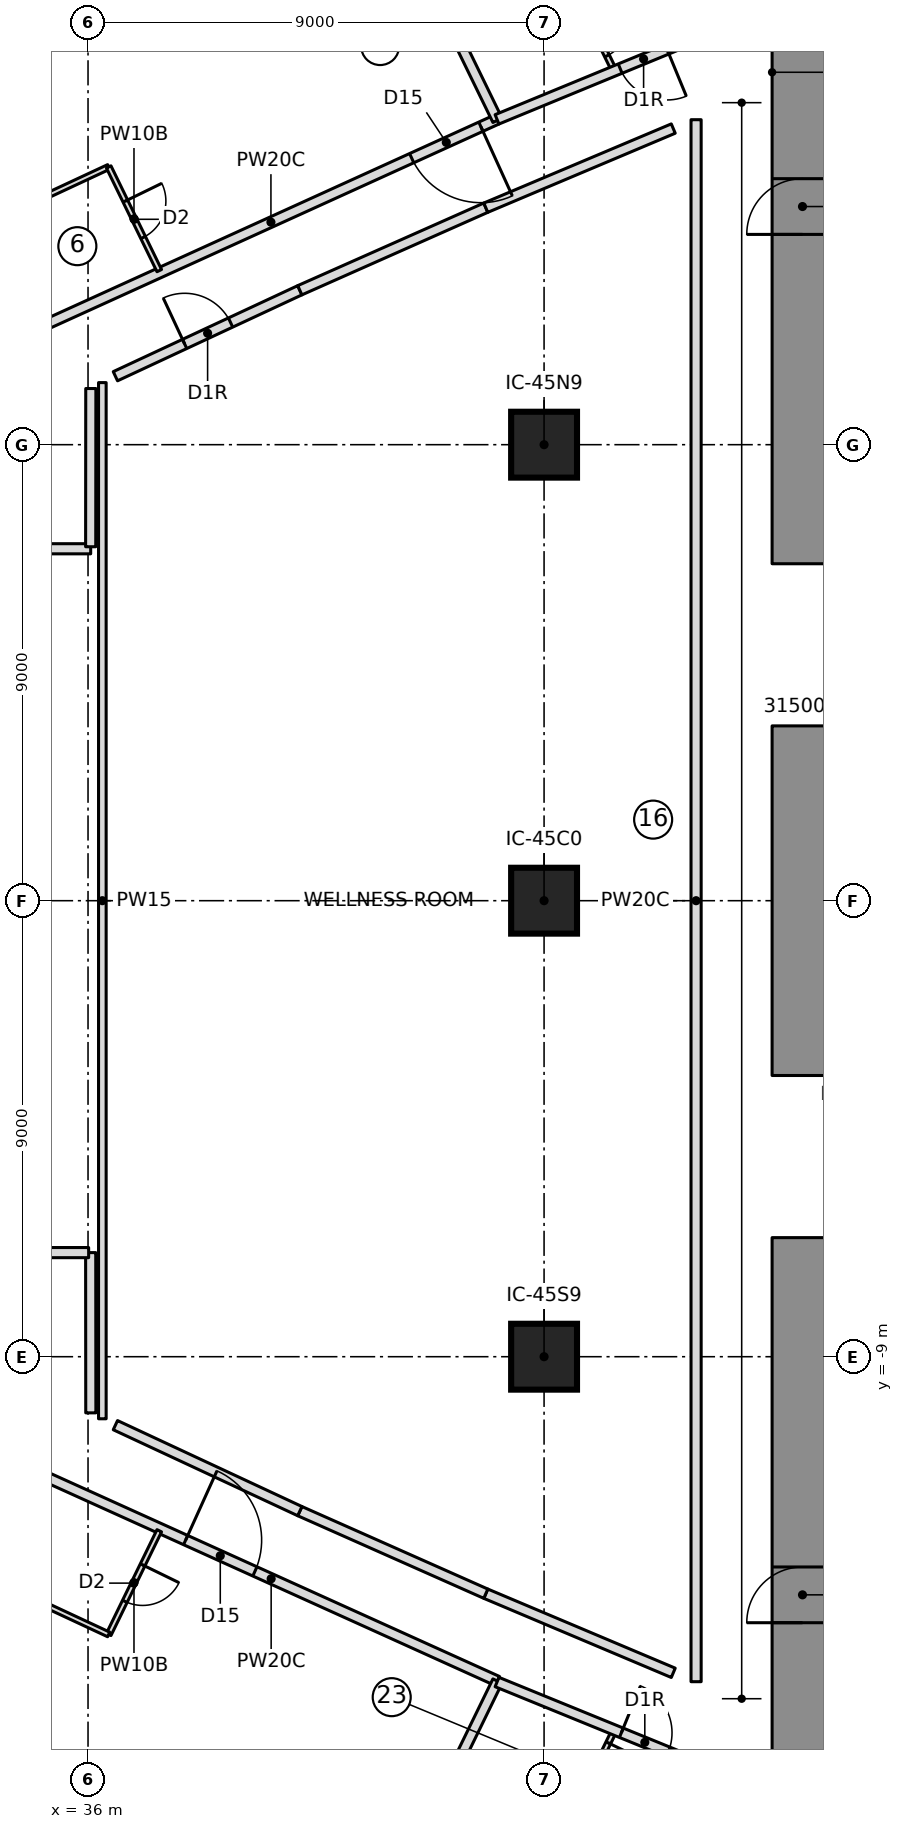
"""IFC4 building model, lengths in metres.
Left out: names, types, materials, properties, quantities, classifications, styles, units other than length and angle.
Written with IfcOpenShell. Run it as: python <this file> out.ifc"""

import sys

from ifc_helpers import new_model, si_unit, direction, frame, frame_2d, origin, origin_2d, place, context, subcontext, project, spatial, rectangle, extrude, element, fill, save


model = new_model("IFC4")
c1 = context("Model", 3, precision=1e-05, world=origin(), true_north=direction((0.0, 1.0)))
c2 = subcontext(c1, "Body", "Model", "MODEL_VIEW")
j1 = project(units=[si_unit("LENGTHUNIT", "METRE"), si_unit("PLANEANGLEUNIT", "RADIAN")], contexts=[c1])
p1 = place(None, origin())
s1 = spatial("IfcSite", under=j1, at=p1, CompositionType="ELEMENT")
p2 = place(p1, origin())
s2 = spatial("IfcBuilding", under=s1, at=p2, CompositionType="ELEMENT")
p3 = place(p2, frame((0.0, 0.0, 64.45)))
s3 = spatial("IfcBuildingStorey", under=s2, at=p3, CompositionType="ELEMENT", Elevation=64.45)
p4 = place(p3, frame((50.1, 6.65, 0.0), z_axis=(0.0, 0.0, 1.0), x_axis=(0.0, 1.0, 0.0)))
e1 = element("IfcWall", 1, at=p4, inside=s3, PredefinedType="SHEAR", context=c2, shape_type="SweptSolid", body=[
    extrude(rectangle(XDim=10.3, YDim=1.2, at=frame_2d((5.15, 0.0))), origin(), (0.0, 0.0, 1.0), 3.55),
])
p5 = place(p4, frame((6.5, 0.0, 0.0)))
e2 = element("IfcOpeningElement", 2, at=p5, cuts=e1, PredefinedType="OPENING", context=c2, shape_type="SweptSolid", body=[
    extrude(rectangle(XDim=1.1, YDim=2.1, at=frame_2d((0.55, 1.05))), frame((0.0, 0.61, 0.0), z_axis=(0.0, -1.0, 0.0), x_axis=(1.0, 0.0, 0.0)), (0.0, 0.0, 1.0), 1.22),
])
p6 = place(p3, frame((50.1, -3.45, 0.0), z_axis=(0.0, 0.0, 1.0), x_axis=(0.0, 1.0, 0.0)))
e3 = element("IfcWall", 3, at=p6, inside=s3, PredefinedType="SHEAR", context=c2, shape_type="SweptSolid", body=[
    extrude(rectangle(XDim=6.9, YDim=1.2, at=frame_2d((3.45, 0.0))), origin(), (0.0, 0.0, 1.0), 3.55),
])
p7 = place(p3, frame((50.1, -16.95, 0.0), z_axis=(0.0, 0.0, 1.0), x_axis=(0.0, 1.0, 0.0)))
e4 = element("IfcWall", 4, at=p7, inside=s3, PredefinedType="SHEAR", context=c2, shape_type="SweptSolid", body=[
    extrude(rectangle(XDim=10.3, YDim=1.2, at=frame_2d((5.15, 0.0))), origin(), (0.0, 0.0, 1.0), 3.55),
])
p8 = place(p7, frame((2.7, 0.0, 0.0)))
e5 = element("IfcOpeningElement", 5, at=p8, cuts=e4, PredefinedType="OPENING", context=c2, shape_type="SweptSolid", body=[
    extrude(rectangle(XDim=1.1, YDim=2.1, at=frame_2d((0.55, 1.05))), frame((0.0, 0.61, 0.0), z_axis=(0.0, -1.0, 0.0), x_axis=(1.0, 0.0, 0.0)), (0.0, 0.0, 1.0), 1.22),
])
for number, where, z_axis, x_axis in (
    (6, (45.0, -9.0, 0.0), (0.0, 0.0, 1.0), (1.0, 0.0, 0.0)),
    (7, (45.0, 0.0, 0.0), (0.0, 0.0, 1.0), (1.0, 0.0, 0.0)),
    (8, (45.0, 9.0, 0.0), (0.0, 0.0, 1.0), (1.0, 0.0, 0.0)),
):
    element("IfcColumn", number, at=place(p3, frame(where, z_axis=z_axis, x_axis=x_axis)), inside=s3, PredefinedType="COLUMN", context=c2, shape_type="SweptSolid", body=[
        extrude(rectangle(XDim=1.3, YDim=1.3, at=origin_2d()), origin(), (0.0, 0.0, 1.0), 3.55),
    ])
p9 = place(p3, frame((44.072, 15.421, 0.0), z_axis=(0.0, 0.0, 1.0), x_axis=(-0.910287143541, -0.413977434534, 0.0)))
e9 = element("IfcWall", 9, at=p9, inside=s3, PredefinedType="PARTITIONING", context=c2, shape_type="SweptSolid", body=[
    extrude(rectangle(XDim=9.803, YDim=0.2, at=frame_2d((4.902, 0.0))), origin(), (0.0, 0.0, 1.0), 3.25),
])
p10 = place(p9, frame((0.35, 0.0, 0.0)))
e10 = element("IfcOpeningElement", 10, at=p10, cuts=e9, PredefinedType="OPENING", context=c2, shape_type="SweptSolid", body=[
    extrude(rectangle(XDim=1.5, YDim=2.1, at=frame_2d((0.75, 1.05))), frame((0.0, 0.11, 0.0), z_axis=(0.0, -1.0, 0.0), x_axis=(1.0, 0.0, 0.0)), (0.0, 0.0, 1.0), 0.22),
])
p11 = place(p3, frame((34.903, 13.781, 0.0), z_axis=(0.0, 0.0, 1.0), x_axis=(0.906434605418, 0.422346192242, 0.0)))
e11 = element("IfcWall", 11, at=p11, inside=s3, PredefinedType="PARTITIONING", context=c2, shape_type="SweptSolid", body=[
    extrude(rectangle(XDim=1.661, YDim=0.1, at=frame_2d((0.83, 0.0))), origin(), (0.0, 0.0, 1.0), 3.25),
])
p12 = place(p3, frame((36.408, 14.482, 0.0), z_axis=(0.0, 0.0, 1.0), x_axis=(0.438271544149, -0.898842618921, 0.0)))
e12 = element("IfcWall", 12, at=p12, inside=s3, PredefinedType="PARTITIONING", context=c2, shape_type="SweptSolid", body=[
    extrude(rectangle(XDim=2.277, YDim=0.1, at=frame_2d((1.139, 0.0))), origin(), (0.0, 0.0, 1.0), 3.25),
])
p13 = place(p12, frame((0.75, 0.0, 0.0)))
e13 = element("IfcOpeningElement", 13, at=p13, cuts=e12, PredefinedType="OPENING", context=c2, shape_type="SweptSolid", body=[
    extrude(rectangle(XDim=0.8, YDim=2.1, at=frame_2d((0.4, 1.05))), frame((0.0, 0.06, 0.0), z_axis=(0.0, -1.0, 0.0), x_axis=(1.0, 0.0, 0.0)), (0.0, 0.0, 1.0), 0.12),
])
p14 = place(p3, frame((44.08, 15.403, 0.0), z_axis=(0.0, 0.0, 1.0), x_axis=(-0.438196739796, 0.898879089328, 0.0)))
e14 = element("IfcWall", 14, at=p14, inside=s3, PredefinedType="PARTITIONING", context=c2, shape_type="SweptSolid", body=[
    extrude(rectangle(XDim=7.611, YDim=0.2, at=frame_2d((3.806, 0.0))), origin(), (0.0, 0.0, 1.0), 3.25),
])
p15 = place(p3, frame((45.65, 17.888, 0.0), z_axis=(0.0, 0.0, 1.0), x_axis=(0.438301838547, -0.89882784688, 0.0)))
e15 = element("IfcWall", 15, at=p15, inside=s3, PredefinedType="PARTITIONING", context=c2, shape_type="SweptSolid", body=[
    extrude(rectangle(XDim=1.659, YDim=0.1, at=frame_2d((0.829, 0.0))), origin(), (0.0, 0.0, 1.0), 3.25),
])
p16 = place(p15, frame((0.55, 0.0, 0.0)))
e16 = element("IfcOpeningElement", 16, at=p16, cuts=e15, PredefinedType="OPENING", context=c2, shape_type="SweptSolid", body=[
    extrude(rectangle(XDim=0.8, YDim=2.1, at=frame_2d((0.4, 1.05))), frame((0.0, 0.06, 0.0), z_axis=(0.0, -1.0, 0.0), x_axis=(1.0, 0.0, 0.0)), (0.0, 0.0, 1.0), 0.12),
])
p17 = place(p3, frame((35.148, -11.362, 0.0), z_axis=(0.0, 0.0, 1.0), x_axis=(0.9111333041, -0.412111759308, 0.0)))
e17 = element("IfcWall", 17, at=p17, inside=s3, PredefinedType="PARTITIONING", context=c2, shape_type="SweptSolid", body=[
    extrude(rectangle(XDim=9.804, YDim=0.2, at=frame_2d((4.902, 0.0))), origin(), (0.0, 0.0, 1.0), 3.25),
])
p18 = place(p17, frame((3.05, 0.0, 0.0)))
e18 = element("IfcOpeningElement", 18, at=p18, cuts=e17, PredefinedType="OPENING", context=c2, shape_type="SweptSolid", body=[
    extrude(rectangle(XDim=1.5, YDim=2.1, at=frame_2d((0.75, 1.05))), frame((0.0, 0.11, 0.0), z_axis=(0.0, -1.0, 0.0), x_axis=(1.0, 0.0, 0.0)), (0.0, 0.0, 1.0), 0.22),
])
p19 = place(p3, frame((37.406, -12.435, 0.0), z_axis=(0.0, 0.0, 1.0), x_axis=(-0.438271544149, -0.898842618921, 0.0)))
e19 = element("IfcWall", 19, at=p19, inside=s3, PredefinedType="PARTITIONING", context=c2, shape_type="SweptSolid", body=[
    extrude(rectangle(XDim=2.277, YDim=0.1, at=frame_2d((1.139, 0.0))), origin(), (0.0, 0.0, 1.0), 3.25),
])
p20 = place(p19, frame((0.75, 0.0, 0.0)))
e20 = element("IfcOpeningElement", 20, at=p20, cuts=e19, PredefinedType="OPENING", context=c2, shape_type="SweptSolid", body=[
    extrude(rectangle(XDim=0.8, YDim=2.1, at=frame_2d((0.4, 1.05))), frame((0.0, 0.06, 0.0), z_axis=(0.0, -1.0, 0.0), x_axis=(1.0, 0.0, 0.0)), (0.0, 0.0, 1.0), 0.12),
])
p21 = place(p3, frame((36.408, -14.482, 0.0), z_axis=(0.0, 0.0, 1.0), x_axis=(-0.906434605418, 0.422346192242, 0.0)))
e21 = element("IfcWall", 21, at=p21, inside=s3, PredefinedType="PARTITIONING", context=c2, shape_type="SweptSolid", body=[
    extrude(rectangle(XDim=1.661, YDim=0.1, at=frame_2d((0.83, 0.0))), origin(), (0.0, 0.0, 1.0), 3.25),
])
p22 = place(p3, frame((40.745, -22.244, 0.0), z_axis=(0.0, 0.0, 1.0), x_axis=(0.438196739796, 0.898879089328, 0.0)))
e22 = element("IfcWall", 22, at=p22, inside=s3, PredefinedType="PARTITIONING", context=c2, shape_type="SweptSolid", body=[
    extrude(rectangle(XDim=7.611, YDim=0.2, at=frame_2d((3.806, 0.0))), origin(), (0.0, 0.0, 1.0), 3.25),
])
p23 = place(p3, frame((46.377, -16.397, 0.0), z_axis=(0.0, 0.0, 1.0), x_axis=(-0.438301838547, -0.89882784688, 0.0)))
e23 = element("IfcWall", 23, at=p23, inside=s3, PredefinedType="PARTITIONING", context=c2, shape_type="SweptSolid", body=[
    extrude(rectangle(XDim=1.659, YDim=0.1, at=frame_2d((0.829, 0.0))), origin(), (0.0, 0.0, 1.0), 3.25),
])
p24 = place(p23, frame((0.25, 0.0, 0.0)))
e24 = element("IfcOpeningElement", 24, at=p24, cuts=e23, PredefinedType="OPENING", context=c2, shape_type="SweptSolid", body=[
    extrude(rectangle(XDim=0.8, YDim=2.1, at=frame_2d((0.4, 1.05))), frame((0.0, 0.06, 0.0), z_axis=(0.0, -1.0, 0.0), x_axis=(1.0, 0.0, 0.0)), (0.0, 0.0, 1.0), 0.12),
])
p25 = place(p3, frame((36.283, -10.225, 0.0), z_axis=(0.0, 0.0, 1.0), x_axis=(0.0, 1.0, 0.0)))
e25 = element("IfcWall", 25, at=p25, inside=s3, PredefinedType="PARTITIONING", context=c2, shape_type="SweptSolid", body=[
    extrude(rectangle(XDim=20.45, YDim=0.15, at=frame_2d((10.225, 0.0))), origin(), (0.0, 0.0, 1.0), 3.25),
])
p26 = place(p3, frame((36.54, 10.351, 0.0), z_axis=(0.0, 0.0, 1.0), x_axis=(0.906347708834, 0.42253263861, 0.0)))
e26 = element("IfcWall", 26, at=p26, inside=s3, PredefinedType="PARTITIONING", context=c2, shape_type="SweptSolid", body=[
    extrude(rectangle(XDim=4.016, YDim=0.2, at=frame_2d((2.008, 0.0))), origin(), (0.0, 0.0, 1.0), 3.25),
])
p27 = place(p26, frame((1.508, 0.0, 0.0)))
e27 = element("IfcOpeningElement", 27, at=p27, cuts=e26, PredefinedType="OPENING", context=c2, shape_type="SweptSolid", body=[
    extrude(rectangle(XDim=1.0, YDim=2.1, at=frame_2d((0.5, 1.05))), frame((0.0, 0.11, 0.0), z_axis=(0.0, -1.0, 0.0), x_axis=(1.0, 0.0, 0.0)), (0.0, 0.0, 1.0), 0.22),
])
p28 = place(p3, frame((40.18, 12.048, 0.0), z_axis=(0.0, 0.0, 1.0), x_axis=(0.913986953061, 0.405743576209, 0.0)))
e28 = element("IfcWall", 28, at=p28, inside=s3, PredefinedType="PARTITIONING", context=c2, shape_type="SweptSolid", body=[
    extrude(rectangle(XDim=4.016, YDim=0.2, at=frame_2d((2.008, 0.0))), origin(), (0.0, 0.0, 1.0), 3.25),
])
for number, where, z_axis, x_axis in (
    (29, (43.85, 13.677, 0.0), (0.0, 0.0, 1.0), (0.921, 0.389, 0.0)),
    (30, (47.55, -15.239, 0.0), (0.0, 0.0, 1.0), (-0.921, 0.389, 0.0)),
):
    element("IfcWall", number, at=place(p3, frame(where, z_axis=z_axis, x_axis=x_axis)), inside=s3, PredefinedType="PARTITIONING", context=c2, shape_type="SweptSolid", body=[
        extrude(rectangle(XDim=4.016, YDim=0.2, at=frame_2d((2.008, 0.0))), origin(), (0.0, 0.0, 1.0), 3.25),
    ])
p29 = place(p3, frame((43.85, -13.677, 0.0), z_axis=(0.0, 0.0, 1.0), x_axis=(-0.913986953061, 0.405743576209, 0.0)))
e31 = element("IfcWall", 31, at=p29, inside=s3, PredefinedType="PARTITIONING", context=c2, shape_type="SweptSolid", body=[
    extrude(rectangle(XDim=4.016, YDim=0.2, at=frame_2d((2.008, 0.0))), origin(), (0.0, 0.0, 1.0), 3.25),
])
p30 = place(p3, frame((40.18, -12.048, 0.0), z_axis=(0.0, 0.0, 1.0), x_axis=(-0.906347708834, 0.42253263861, 0.0)))
e32 = element("IfcWall", 32, at=p30, inside=s3, PredefinedType="PARTITIONING", context=c2, shape_type="SweptSolid", body=[
    extrude(rectangle(XDim=4.016, YDim=0.2, at=frame_2d((2.008, 0.0))), origin(), (0.0, 0.0, 1.0), 3.25),
])
p31 = place(p3, frame((47.704, 16.917, 0.0), z_axis=(0.0, 0.0, 1.0), x_axis=(-0.924573816857, -0.381002962169, 0.0)))
e33 = element("IfcWall", 33, at=p31, inside=s3, PredefinedType="PARTITIONING", context=c2, shape_type="SweptSolid", body=[
    extrude(rectangle(XDim=3.929, YDim=0.2, at=frame_2d((1.964, 0.0))), origin(), (0.0, 0.0, 1.0), 3.25),
])
p32 = place(p31, frame((0.3, 0.0, 0.0)))
e34 = element("IfcOpeningElement", 34, at=p32, cuts=e33, PredefinedType="OPENING", context=c2, shape_type="SweptSolid", body=[
    extrude(rectangle(XDim=1.0, YDim=2.1, at=frame_2d((0.5, 1.05))), frame((0.0, 0.11, 0.0), z_axis=(0.0, -1.0, 0.0), x_axis=(1.0, 0.0, 0.0)), (0.0, 0.0, 1.0), 0.22),
])
p33 = place(p3, frame((44.072, -15.421, 0.0), z_axis=(0.0, 0.0, 1.0), x_axis=(0.925861862022, -0.377862160653, 0.0)))
e35 = element("IfcWall", 35, at=p33, inside=s3, PredefinedType="PARTITIONING", context=c2, shape_type="SweptSolid", body=[
    extrude(rectangle(XDim=3.923, YDim=0.2, at=frame_2d((1.961, 0.0))), origin(), (0.0, 0.0, 1.0), 3.25),
])
p34 = place(p33, frame((2.65, 0.0, 0.0)))
e36 = element("IfcOpeningElement", 36, at=p34, cuts=e35, PredefinedType="OPENING", context=c2, shape_type="SweptSolid", body=[
    extrude(rectangle(XDim=1.0, YDim=2.1, at=frame_2d((0.5, 1.05))), frame((0.0, 0.11, 0.0), z_axis=(0.0, -1.0, 0.0), x_axis=(1.0, 0.0, 0.0)), (0.0, 0.0, 1.0), 0.22),
])
p35 = place(p3, frame((36.055, -10.108, 0.0), z_axis=(0.0, 0.0, 1.0), x_axis=(-0.00077190251, 0.999999702083, 0.0)))
e37 = element("IfcWall", 37, at=p35, inside=s3, PredefinedType="PARTITIONING", context=c2, shape_type="SweptSolid", body=[
    extrude(rectangle(XDim=3.163, YDim=0.2, at=frame_2d((1.582, 0.0))), origin(), (0.0, 0.0, 1.0), 3.25),
])
for number, where, z_axis, x_axis in (
    (38, (36.012, -6.946, 0.0), (0.0, 0.0, 1.0), (-1.0, 6.007e-05, 0.0)),
    (39, (31.989, 6.945, 0.0), (0.0, 0.0, 1.0), (1.0, 6.007e-05, 0.0)),
):
    element("IfcWall", number, at=place(p3, frame(where, z_axis=z_axis, x_axis=x_axis)), inside=s3, PredefinedType="PARTITIONING", context=c2, shape_type="SweptSolid", body=[
        extrude(rectangle(XDim=4.064, YDim=0.2, at=frame_2d((2.032, 0.0))), origin(), (0.0, 0.0, 1.0), 3.25),
    ])
p36 = place(p3, frame((36.052, 6.986, 0.0), z_axis=(0.0, 0.0, 1.0), x_axis=(0.000781799464, 0.999999694395, 0.0)))
e40 = element("IfcWall", 40, at=p36, inside=s3, PredefinedType="PARTITIONING", context=c2, shape_type="SweptSolid", body=[
    extrude(rectangle(XDim=3.123, YDim=0.2, at=frame_2d((1.562, 0.0))), origin(), (0.0, 0.0, 1.0), 3.25),
])
p37 = place(p3, frame((48.0, 15.414, 0.0), z_axis=(0.0, 0.0, 1.0), x_axis=(0.0, -1.0, 0.0)))
e41 = element("IfcWall", 41, at=p37, inside=s3, PredefinedType="PARTITIONING", context=c2, shape_type="SweptSolid", body=[
    extrude(rectangle(XDim=30.828, YDim=0.2, at=frame_2d((15.414, 0.0))), origin(), (0.0, 0.0, 1.0), 3.25),
])
p38 = place(p13, origin())
e42 = element("IfcDoor", 42, at=p38, inside=s3, OperationType="SINGLE_SWING_LEFT", PredefinedType="DOOR", context=c2, shape_type="SweptSolid", body=[
    extrude(rectangle(XDim=0.8, YDim=2.1, at=frame_2d((0.4, 1.05))), frame((0.0, 0.025, 0.0), z_axis=(0.0, -1.0, 0.0), x_axis=(1.0, 0.0, 0.0)), (0.0, 0.0, 1.0), 0.05),
])
fill(e13, e42)
p39 = place(p10, origin())
e43 = element("IfcDoor", 43, at=p39, inside=s3, OperationType="DOUBLE_DOOR_SINGLE_SWING", PredefinedType="DOOR", context=c2, shape_type="SweptSolid", body=[
    extrude(rectangle(XDim=1.5, YDim=2.1, at=frame_2d((0.75, 1.05))), frame((0.0, 0.025, 0.0), z_axis=(0.0, -1.0, 0.0), x_axis=(1.0, 0.0, 0.0)), (0.0, 0.0, 1.0), 0.05),
])
fill(e10, e43)
p40 = place(p16, origin())
e44 = element("IfcDoor", 44, at=p40, inside=s3, OperationType="SINGLE_SWING_LEFT", PredefinedType="DOOR", context=c2, shape_type="SweptSolid", body=[
    extrude(rectangle(XDim=0.8, YDim=2.1, at=frame_2d((0.4, 1.05))), frame((0.0, 0.025, 0.0), z_axis=(0.0, -1.0, 0.0), x_axis=(1.0, 0.0, 0.0)), (0.0, 0.0, 1.0), 0.05),
])
fill(e16, e44)
p41 = place(p32, origin())
e45 = element("IfcDoor", 45, at=p41, inside=s3, OperationType="SINGLE_SWING_RIGHT", PredefinedType="DOOR", context=c2, shape_type="SweptSolid", body=[
    extrude(rectangle(XDim=1.0, YDim=2.1, at=frame_2d((0.5, 1.05))), frame((0.0, 0.025, 0.0), z_axis=(0.0, -1.0, 0.0), x_axis=(1.0, 0.0, 0.0)), (0.0, 0.0, 1.0), 0.05),
])
fill(e34, e45)
p42 = place(p20, origin())
e46 = element("IfcDoor", 46, at=p42, inside=s3, OperationType="SINGLE_SWING_LEFT", PredefinedType="DOOR", context=c2, shape_type="SweptSolid", body=[
    extrude(rectangle(XDim=0.8, YDim=2.1, at=frame_2d((0.4, 1.05))), frame((0.0, 0.025, 0.0), z_axis=(0.0, -1.0, 0.0), x_axis=(1.0, 0.0, 0.0)), (0.0, 0.0, 1.0), 0.05),
])
fill(e20, e46)
p43 = place(p18, origin())
e47 = element("IfcDoor", 47, at=p43, inside=s3, OperationType="DOUBLE_DOOR_SINGLE_SWING", PredefinedType="DOOR", context=c2, shape_type="SweptSolid", body=[
    extrude(rectangle(XDim=1.5, YDim=2.1, at=frame_2d((0.75, 1.05))), frame((0.0, 0.025, 0.0), z_axis=(0.0, -1.0, 0.0), x_axis=(1.0, 0.0, 0.0)), (0.0, 0.0, 1.0), 0.05),
])
fill(e18, e47)
p44 = place(p24, origin())
e48 = element("IfcDoor", 48, at=p44, inside=s3, OperationType="SINGLE_SWING_LEFT", PredefinedType="DOOR", context=c2, shape_type="SweptSolid", body=[
    extrude(rectangle(XDim=0.8, YDim=2.1, at=frame_2d((0.4, 1.05))), frame((0.0, 0.025, 0.0), z_axis=(0.0, -1.0, 0.0), x_axis=(1.0, 0.0, 0.0)), (0.0, 0.0, 1.0), 0.05),
])
fill(e24, e48)
p45 = place(p34, origin())
e49 = element("IfcDoor", 49, at=p45, inside=s3, OperationType="SINGLE_SWING_RIGHT", PredefinedType="DOOR", context=c2, shape_type="SweptSolid", body=[
    extrude(rectangle(XDim=1.0, YDim=2.1, at=frame_2d((0.5, 1.05))), frame((0.0, 0.025, 0.0), z_axis=(0.0, -1.0, 0.0), x_axis=(1.0, 0.0, 0.0)), (0.0, 0.0, 1.0), 0.05),
])
fill(e36, e49)
p46 = place(p27, origin())
e50 = element("IfcDoor", 50, at=p46, inside=s3, OperationType="SINGLE_SWING_RIGHT", PredefinedType="DOOR", context=c2, shape_type="SweptSolid", body=[
    extrude(rectangle(XDim=1.0, YDim=2.1, at=frame_2d((0.5, 1.05))), frame((0.0, 0.025, 0.0), z_axis=(0.0, -1.0, 0.0), x_axis=(1.0, 0.0, 0.0)), (0.0, 0.0, 1.0), 0.05),
])
fill(e27, e50)
p47 = place(p5, origin())
e51 = element("IfcDoor", 51, at=p47, inside=s3, OperationType="SINGLE_SWING_RIGHT", PredefinedType="DOOR", context=c2, shape_type="SweptSolid", body=[
    extrude(rectangle(XDim=1.1, YDim=2.1, at=frame_2d((0.55, 1.05))), frame((0.0, 0.025, 0.0), z_axis=(0.0, -1.0, 0.0), x_axis=(1.0, 0.0, 0.0)), (0.0, 0.0, 1.0), 0.05),
])
fill(e2, e51)
p48 = place(p8, origin())
e52 = element("IfcDoor", 52, at=p48, inside=s3, OperationType="SINGLE_SWING_RIGHT", PredefinedType="DOOR", context=c2, shape_type="SweptSolid", body=[
    extrude(rectangle(XDim=1.1, YDim=2.1, at=frame_2d((0.55, 1.05))), frame((0.0, 0.025, 0.0), z_axis=(0.0, -1.0, 0.0), x_axis=(1.0, 0.0, 0.0)), (0.0, 0.0, 1.0), 0.05),
])
fill(e5, e52)
save(model, sys.argv[1])
